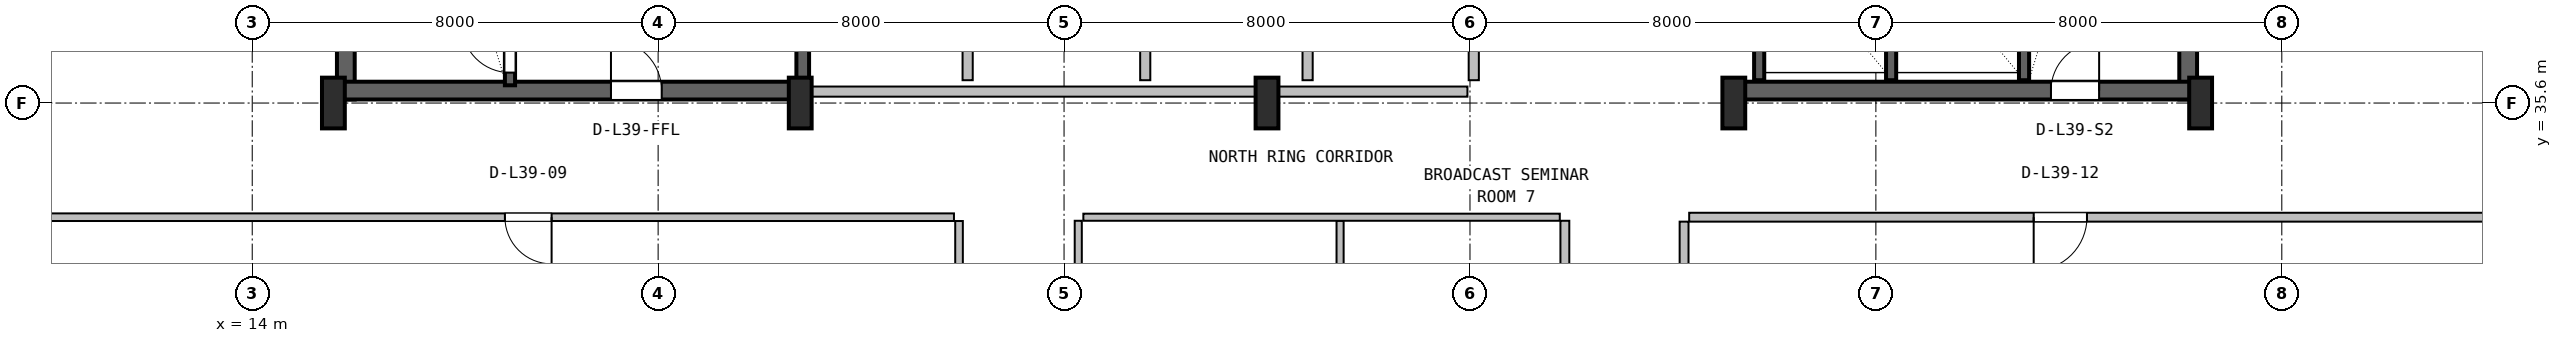
"""IFC4 building model, lengths in metres.
Left out: names, types, materials, properties, quantities, classifications, styles, units other than length and angle.
Written with IfcOpenShell. Run it as: python <this file> out.ifc"""

import sys

from ifc_helpers import new_model, si_unit, direction, frame, frame_2d, origin, origin_2d, place, context, subcontext, project, spatial, rectangle, i_section, extrude, source, transform, mapped, element, fill, save


model = new_model("IFC4")
c1 = context("Model", 3, precision=1e-05, world=origin(), true_north=direction((0.0, 1.0)))
c2 = subcontext(c1, "Body", "Model", "MODEL_VIEW")
j1 = project(units=[si_unit("LENGTHUNIT", "METRE"), si_unit("PLANEANGLEUNIT", "RADIAN")], contexts=[c1])
p1 = place(None, origin())
s1 = spatial("IfcSite", under=j1, at=p1, CompositionType="ELEMENT")
p2 = place(p1, origin())
s2 = spatial("IfcBuilding", under=s1, at=p2, CompositionType="ELEMENT")
p3 = place(p2, frame((0.0, 0.0, 161.0)))
s3 = spatial("IfcBuildingStorey", under=s2, at=p3, CompositionType="ELEMENT", Elevation=161.0)
for number, where, z_axis, x_axis in (
    (1, (15.845, 35.67, 0.0), (0.0, 0.0, 1.0), (0.0, 1.0, 0.0)),
    (2, (52.155, 35.67, 0.0), (0.0, 0.0, 1.0), (0.0, 1.0, 0.0)),
):
    element("IfcWall", number, at=place(p3, frame(where, z_axis=z_axis, x_axis=x_axis)), inside=s3, PredefinedType="SHEAR", context=c2, shape_type="SweptSolid", body=[
        extrude(rectangle(XDim=11.13, YDim=0.35, at=frame_2d((5.565, 0.0))), origin(), (0.0, 0.0, 1.0), 3.55),
    ])
p4 = place(p3, frame((15.67, 35.845, 0.0), z_axis=(0.0, 0.0, 1.0), x_axis=(1.0, 0.0, 0.0)))
e3 = element("IfcWall", 3, at=p4, inside=s3, PredefinedType="SHEAR", context=c2, shape_type="SweptSolid", body=[
    extrude(rectangle(XDim=9.13, YDim=0.35, at=frame_2d((4.565, 0.0))), origin(), (0.0, 0.0, 1.0), 3.55),
])
p5 = place(p4, frame((5.4, 0.0, 0.0)))
e4 = element("IfcOpeningElement", 4, at=p5, cuts=e3, PredefinedType="OPENING", context=c2, shape_type="SweptSolid", body=[
    extrude(rectangle(XDim=1.0, YDim=2.1, at=frame_2d((0.5, 1.05))), frame((0.0, 0.185, 0.0), z_axis=(0.0, -1.0, 0.0), x_axis=(1.0, 0.0, 0.0)), (0.0, 0.0, 1.0), 0.37),
])
p6 = place(p3, frame((43.2, 35.845, 0.0), z_axis=(0.0, 0.0, 1.0), x_axis=(1.0, 0.0, 0.0)))
e5 = element("IfcWall", 5, at=p6, inside=s3, PredefinedType="SHEAR", context=c2, shape_type="SweptSolid", body=[
    extrude(rectangle(XDim=9.13, YDim=0.35, at=frame_2d((4.565, 0.0))), origin(), (0.0, 0.0, 1.0), 3.55),
])
p7 = place(p6, frame((6.25, 0.0, 0.0)))
e6 = element("IfcOpeningElement", 6, at=p7, cuts=e5, PredefinedType="OPENING", context=c2, shape_type="SweptSolid", body=[
    extrude(rectangle(XDim=0.95, YDim=2.1, at=frame_2d((0.475, 1.05))), frame((0.0, 0.185, 0.0), z_axis=(0.0, -1.0, 0.0), x_axis=(1.0, 0.0, 0.0)), (0.0, 0.0, 1.0), 0.37),
])
m1 = source(origin(), c2, "Body", "SweptSolid", [
    extrude(i_section(OverallWidth=0.45, OverallDepth=1.0, WebThickness=0.016, FlangeThickness=0.03, FilletRadius=0.016, at=origin_2d()), origin(), (0.0, 0.0, 1.0), 3.8),
])
for number, where, z_axis, x_axis in (
    (7, (15.6, 35.6, 0.0), (0.0, 0.0, 1.0), (1.0, 0.0, 0.0)),
    (8, (24.8, 35.6, 0.0), (0.0, 0.0, 1.0), (1.0, 0.0, 0.0)),
    (9, (34.0, 35.6, 0.0), (0.0, 0.0, 1.0), (1.0, 0.0, 0.0)),
    (10, (43.2, 35.6, 0.0), (0.0, 0.0, 1.0), (1.0, 0.0, 0.0)),
    (11, (52.4, 35.6, 0.0), (0.0, 0.0, 1.0), (1.0, 0.0, 0.0)),
):
    element("IfcColumn", number, at=place(p3, frame(where, z_axis=z_axis, x_axis=x_axis)), inside=s3, PredefinedType="COLUMN", context=c2, shape_type="MappedRepresentation", body=[
        mapped(m1, transform((0.0, 0.0, 0.0), x_axis=(1.0, 0.0, 0.0), y_axis=(0.0, 1.0, 0.0), z_axis=(0.0, 0.0, 1.0), scale=1.0)),
    ])
p8 = place(p3, frame((19.08, 35.95, 0.0), z_axis=(0.0, 0.0, 1.0), x_axis=(0.0, 1.0, 0.0)))
e12 = element("IfcWall", 12, at=p8, inside=s3, PredefinedType="SHEAR", context=c2, shape_type="SweptSolid", body=[
    extrude(rectangle(XDim=9.65, YDim=0.2, at=frame_2d((4.825, 0.0))), origin(), (0.0, 0.0, 1.0), 3.55),
])
p9 = place(p8, frame((0.25, 0.0, 0.0)))
e13 = element("IfcOpeningElement", 13, at=p9, cuts=e12, PredefinedType="OPENING", context=c2, shape_type="SweptSolid", body=[
    extrude(rectangle(XDim=0.95, YDim=2.1, at=frame_2d((0.475, 1.05))), frame((0.0, 0.11, 0.0), z_axis=(0.0, -1.0, 0.0), x_axis=(1.0, 0.0, 0.0)), (0.0, 0.0, 1.0), 0.22),
])
p10 = place(p3, frame((24.85, 36.05, 0.0), z_axis=(0.0, 0.0, 1.0), x_axis=(0.0, 1.0, 0.0)))
e14 = element("IfcWall", 14, at=p10, inside=s3, PredefinedType="SHEAR", context=c2, shape_type="SweptSolid", body=[
    extrude(rectangle(XDim=10.45, YDim=0.25, at=frame_2d((5.225, 0.0))), origin(), (0.0, 0.0, 1.0), 3.55),
])
p11 = place(p3, frame((48.92, 36.05, 0.0), z_axis=(0.0, 0.0, 1.0), x_axis=(0.0, 1.0, 0.0)))
e15 = element("IfcWall", 15, at=p11, inside=s3, PredefinedType="SHEAR", context=c2, shape_type="SweptSolid", body=[
    extrude(rectangle(XDim=10.5, YDim=0.2, at=frame_2d((5.25, 0.0))), origin(), (0.0, 0.0, 1.0), 3.55),
])
for number, where, z_axis, x_axis in (
    (16, (43.7, 36.05, 0.0), (0.0, 0.0, 1.0), (0.0, 1.0, 0.0)),
    (17, (46.3, 36.05, 0.0), (0.0, 0.0, 1.0), (0.0, 1.0, 0.0)),
):
    element("IfcWall", number, at=place(p3, frame(where, z_axis=z_axis, x_axis=x_axis)), inside=s3, PredefinedType="SHEAR", context=c2, shape_type="SweptSolid", body=[
        extrude(rectangle(XDim=3.05, YDim=0.2, at=frame_2d((1.525, 0.0))), origin(), (0.0, 0.0, 1.0), 3.55),
    ])
p12 = place(p3, frame((25.0, 35.825, 0.0), z_axis=(0.0, 0.0, 1.0), x_axis=(1.0, 0.0, 0.0)))
e18 = element("IfcWall", 18, at=p12, inside=s3, PredefinedType="SOLIDWALL", context=c2, shape_type="SweptSolid", body=[
    extrude(rectangle(XDim=12.95, YDim=0.2, at=frame_2d((6.475, 0.0))), origin(), (0.0, 0.0, 1.0), 2.575),
])
for number, where, z_axis, x_axis in (
    (19, (28.1, 36.05, 0.0), (0.0, 0.0, 1.0), (0.0, 1.0, 0.0)),
    (20, (31.6, 36.05, 0.0), (0.0, 0.0, 1.0), (0.0, 1.0, 0.0)),
):
    element("IfcWall", number, at=place(p3, frame(where, z_axis=z_axis, x_axis=x_axis)), inside=s3, PredefinedType="PLUMBINGWALL", context=c2, shape_type="SweptSolid", body=[
        extrude(rectangle(XDim=3.1, YDim=0.2, at=frame_2d((1.55, 0.0))), origin(), (0.0, 0.0, 1.0), 3.53),
    ])
for number, where, z_axis, x_axis in (
    (21, (34.8, 36.05, 0.0), (0.0, 0.0, 1.0), (0.0, 1.0, 0.0)),
    (22, (38.075, 36.05, 0.0), (0.0, 0.0, 1.0), (0.0, 1.0, 0.0)),
):
    element("IfcWall", number, at=place(p3, frame(where, z_axis=z_axis, x_axis=x_axis)), inside=s3, PredefinedType="SOLIDWALL", context=c2, shape_type="SweptSolid", body=[
        extrude(rectangle(XDim=3.1, YDim=0.2, at=frame_2d((1.55, 0.0))), origin(), (0.0, 0.0, 1.0), 3.53),
    ])
p13 = place(p3, frame((27.93, 26.647, 0.0), z_axis=(0.0, 0.0, 1.0), x_axis=(0.0, 1.0, 0.0)))
e23 = element("IfcWall", 23, at=p13, inside=s3, PredefinedType="PARTITIONING", context=c2, shape_type="SweptSolid", body=[
    extrude(rectangle(XDim=6.628, YDim=0.15, at=frame_2d((3.314, 0.0))), origin(), (0.0, 0.0, 1.0), 3.222),
])
p14 = place(p3, frame((7.18, 33.35, 0.0), z_axis=(0.0, 0.0, 1.0), x_axis=(1.0, 0.0, 0.0)))
e24 = element("IfcWall", 24, at=p14, inside=s3, PredefinedType="PARTITIONING", context=c2, shape_type="SweptSolid", body=[
    extrude(rectangle(XDim=20.65, YDim=0.15, at=frame_2d((10.325, 0.0))), origin(), (0.0, 0.0, 1.0), 2.909),
])
p15 = place(p14, frame((11.8, 0.0, 0.0)))
e25 = element("IfcOpeningElement", 25, at=p15, cuts=e24, PredefinedType="OPENING", context=c2, shape_type="SweptSolid", body=[
    extrude(rectangle(XDim=0.92, YDim=2.08, at=frame_2d((0.46, 1.04))), frame((0.0, 0.085, 0.0), z_axis=(0.0, -1.0, 0.0), x_axis=(1.0, 0.0, 0.0)), (0.0, 0.0, 1.0), 0.17),
])
p16 = place(p3, frame((35.44, 28.98, 0.0), z_axis=(0.0, 0.0, 1.0), x_axis=(0.0, 1.0, 0.0)))
e26 = element("IfcWall", 26, at=p16, inside=s3, PredefinedType="PARTITIONING", context=c2, shape_type="SweptSolid", body=[
    extrude(rectangle(XDim=4.3, YDim=0.14, at=frame_2d((2.15, 0.0))), origin(), (0.0, 0.0, 1.0), 3.222),
])
p17 = place(p3, frame((30.38, 33.35, 0.0), z_axis=(0.0, 0.0, 1.0), x_axis=(1.0, 0.0, 0.0)))
e27 = element("IfcWall", 27, at=p17, inside=s3, PredefinedType="PARTITIONING", context=c2, shape_type="SweptSolid", body=[
    extrude(rectangle(XDim=9.39, YDim=0.14, at=frame_2d((4.695, 0.0))), origin(), (0.0, 0.0, 1.0), 2.909),
])
p18 = place(p3, frame((30.28, 28.98, 0.0), z_axis=(0.0, 0.0, 1.0), x_axis=(0.0, 1.0, 0.0)))
e28 = element("IfcWall", 28, at=p18, inside=s3, PredefinedType="PARTITIONING", context=c2, shape_type="SweptSolid", body=[
    extrude(rectangle(XDim=4.3, YDim=0.14, at=frame_2d((2.15, 0.0))), origin(), (0.0, 0.0, 1.0), 3.222),
])
p19 = place(p3, frame((39.87, 28.98, 0.0), z_axis=(0.0, 0.0, 1.0), x_axis=(0.0, 1.0, 0.0)))
e29 = element("IfcWall", 29, at=p19, inside=s3, PredefinedType="PARTITIONING", context=c2, shape_type="SweptSolid", body=[
    extrude(rectangle(XDim=4.3, YDim=0.175, at=frame_2d((2.15, 0.0))), origin(), (0.0, 0.0, 1.0), 3.222),
])
p20 = place(p19, frame((1.625, 0.0, 0.0)))
e30 = element("IfcOpeningElement", 30, at=p20, cuts=e29, PredefinedType="OPENING", context=c2, shape_type="SweptSolid", body=[
    extrude(rectangle(XDim=1.05, YDim=2.1, at=frame_2d((0.525, 1.05))), frame((0.0, 0.098, 0.0), z_axis=(0.0, -1.0, 0.0), x_axis=(1.0, 0.0, 0.0)), (0.0, 0.0, 1.0), 0.195),
])
p21 = place(p3, frame((42.32, 33.35, 0.0), z_axis=(0.0, 0.0, 1.0), x_axis=(1.0, 0.0, 0.0)))
e31 = element("IfcWall", 31, at=p21, inside=s3, PredefinedType="PARTITIONING", context=c2, shape_type="SweptSolid", body=[
    extrude(rectangle(XDim=18.5, YDim=0.175, at=frame_2d((9.25, 0.0))), origin(), (0.0, 0.0, 1.0), 2.909),
])
p22 = place(p21, frame((6.79, 0.0, 0.0)))
e32 = element("IfcOpeningElement", 32, at=p22, cuts=e31, PredefinedType="OPENING", context=c2, shape_type="SweptSolid", body=[
    extrude(rectangle(XDim=1.05, YDim=2.1, at=frame_2d((0.525, 1.05))), frame((0.0, 0.098, 0.0), z_axis=(0.0, -1.0, 0.0), x_axis=(1.0, 0.0, 0.0)), (0.0, 0.0, 1.0), 0.195),
])
p23 = place(p3, frame((42.22, 26.647, 0.0), z_axis=(0.0, 0.0, 1.0), x_axis=(0.0, 1.0, 0.0)))
e33 = element("IfcWall", 33, at=p23, inside=s3, PredefinedType="PARTITIONING", context=c2, shape_type="SweptSolid", body=[
    extrude(rectangle(XDim=6.616, YDim=0.175, at=frame_2d((3.308, 0.0))), origin(), (0.0, 0.0, 1.0), 3.222),
])
m2 = source(origin(), c2, "Body", "SweptSolid", [
    extrude(rectangle(XDim=0.95, YDim=2.1, at=frame_2d((0.475, 1.05))), frame((0.0, 0.025, 0.0), z_axis=(0.0, -1.0, 0.0), x_axis=(1.0, 0.0, 0.0)), (0.0, 0.0, 1.0), 0.05),
])
p24 = place(p9, origin())
e34 = element("IfcDoor", 34, at=p24, inside=s3, OperationType="SINGLE_SWING_RIGHT", PredefinedType="DOOR", context=c2, shape_type="MappedRepresentation", body=[
    mapped(m2, transform((0.0, 0.0, 0.0), x_axis=(1.0, 0.0, 0.0), y_axis=(0.0, 1.0, 0.0), z_axis=(0.0, 0.0, 1.0), scale=1.0)),
])
fill(e13, e34)
m3 = source(origin(), c2, "Body", "SweptSolid", [
    extrude(rectangle(XDim=1.0, YDim=2.1, at=frame_2d((0.5, 1.05))), frame((0.0, 0.025, 0.0), z_axis=(0.0, -1.0, 0.0), x_axis=(1.0, 0.0, 0.0)), (0.0, 0.0, 1.0), 0.05),
])
p25 = place(p5, origin())
e35 = element("IfcDoor", 35, at=p25, inside=s3, OperationType="SINGLE_SWING_LEFT", PredefinedType="DOOR", context=c2, shape_type="MappedRepresentation", body=[
    mapped(m3, transform((0.0, 0.0, 0.0), x_axis=(1.0, 0.0, 0.0), y_axis=(0.0, 1.0, 0.0), z_axis=(0.0, 0.0, 1.0), scale=1.0)),
])
fill(e4, e35)
p26 = place(p7, origin())
e36 = element("IfcDoor", 36, at=p26, inside=s3, OperationType="SINGLE_SWING_RIGHT", PredefinedType="DOOR", context=c2, shape_type="MappedRepresentation", body=[
    mapped(m2, transform((0.0, 0.0, 0.0), x_axis=(1.0, 0.0, 0.0), y_axis=(0.0, 1.0, 0.0), z_axis=(0.0, 0.0, 1.0), scale=1.0)),
])
fill(e6, e36)
m4 = source(origin(), c2, "Body", "SweptSolid", [
    extrude(rectangle(XDim=0.92, YDim=2.08, at=frame_2d((0.46, 1.04))), frame((0.0, 0.025, 0.0), z_axis=(0.0, -1.0, 0.0), x_axis=(1.0, 0.0, 0.0)), (0.0, 0.0, 1.0), 0.05),
])
p27 = place(p15, frame((0.92, 0.0, 0.0), z_axis=(0.0, 0.0, 1.0), x_axis=(-1.0, 0.0, 0.0)))
e37 = element("IfcDoor", 37, at=p27, inside=s3, OperationType="SINGLE_SWING_RIGHT", PredefinedType="DOOR", context=c2, shape_type="MappedRepresentation", body=[
    mapped(m4, transform((0.0, 0.0, 0.0), x_axis=(1.0, 0.0, 0.0), y_axis=(0.0, 1.0, 0.0), z_axis=(0.0, 0.0, 1.0), scale=1.0)),
])
fill(e25, e37)
m5 = source(origin(), c2, "Body", "SweptSolid", [
    extrude(rectangle(XDim=1.05, YDim=2.1, at=frame_2d((0.525, 1.05))), frame((0.0, 0.025, 0.0), z_axis=(0.0, -1.0, 0.0), x_axis=(1.0, 0.0, 0.0)), (0.0, 0.0, 1.0), 0.05),
])
p28 = place(p22, frame((1.05, 0.0, 0.0), z_axis=(0.0, 0.0, 1.0), x_axis=(-1.0, 0.0, 0.0)))
e38 = element("IfcDoor", 38, at=p28, inside=s3, OperationType="SINGLE_SWING_LEFT", PredefinedType="DOOR", context=c2, shape_type="MappedRepresentation", body=[
    mapped(m5, transform((0.0, 0.0, 0.0), x_axis=(1.0, 0.0, 0.0), y_axis=(0.0, 1.0, 0.0), z_axis=(0.0, 0.0, 1.0), scale=1.0)),
])
fill(e32, e38)
save(model, sys.argv[1])
